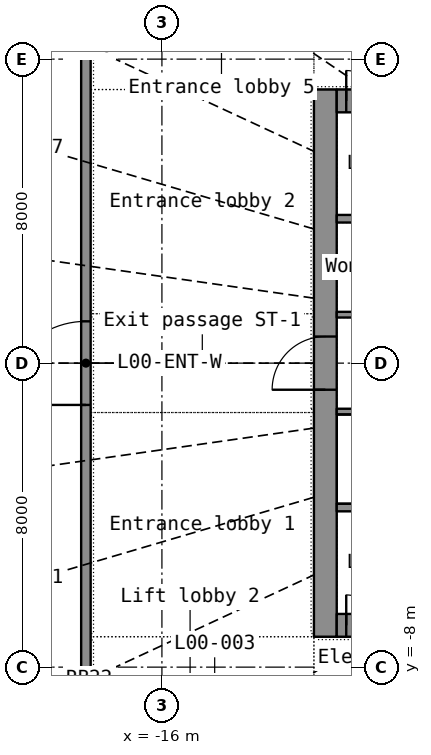
"""IFC4 building model, lengths in metres.
Left out: names, types, materials, properties, quantities, classifications, styles, units other than length and angle.
Written with IfcOpenShell. Run it as: python <this file> out.ifc"""

import sys

from ifc_helpers import new_model, si_unit, direction, frame, frame_2d, origin, place, context, subcontext, project, spatial, rectangle, extrude, element, fill, save


model = new_model("IFC4")
c1 = context("Model", 3, precision=1e-05, world=origin(), true_north=direction((0.0, 1.0)))
c2 = subcontext(c1, "Body", "Model", "MODEL_VIEW")
j1 = project(units=[si_unit("LENGTHUNIT", "METRE"), si_unit("PLANEANGLEUNIT", "RADIAN")], contexts=[c1])
p1 = place(None, origin())
s1 = spatial("IfcSite", under=j1, at=p1, CompositionType="ELEMENT")
p2 = place(p1, origin())
s2 = spatial("IfcBuilding", under=s1, at=p2, CompositionType="ELEMENT")
p3 = place(p2, origin())
s3 = spatial("IfcBuildingStorey", under=s2, at=p3, CompositionType="ELEMENT", Elevation=0.0)
p4 = place(p3, frame((-18.0, -9.0, 0.0), z_axis=(0.0, 0.0, 1.0), x_axis=(0.0, 1.0, 0.0)))
e1 = element("IfcWall", 1, at=p4, inside=s3, PredefinedType="STANDARD", context=c2, shape_type="SweptSolid", body=[
    extrude(rectangle(XDim=18.0, YDim=0.25, at=frame_2d((9.0, 0.0))), origin(), (0.0, 0.0, 1.0), 6.6),
])
p5 = place(p4, frame((7.9, 0.0, 0.0)))
e2 = element("IfcOpeningElement", 2, at=p5, cuts=e1, PredefinedType="OPENING", context=c2, shape_type="SweptSolid", body=[
    extrude(rectangle(XDim=2.2, YDim=2.4, at=frame_2d((1.1, 1.2))), frame((0.0, 0.135, 0.0), z_axis=(0.0, -1.0, 0.0), x_axis=(1.0, 0.0, 0.0)), (0.0, 0.0, 1.0), 0.27),
])
p6 = place(p3, frame((-11.7, -7.2, 0.0), z_axis=(0.0, 0.0, 1.0), x_axis=(0.0, 1.0, 0.0)))
e3 = element("IfcWall", 3, at=p6, inside=s3, PredefinedType="SHEAR", context=c2, shape_type="SweptSolid", body=[
    extrude(rectangle(XDim=14.4, YDim=0.6, at=frame_2d((7.2, 0.0))), origin(), (0.0, 0.0, 1.0), 6.6),
])
p7 = place(p6, frame((6.5, 0.0, 0.0)))
e4 = element("IfcOpeningElement", 4, at=p7, cuts=e3, PredefinedType="OPENING", context=c2, shape_type="SweptSolid", body=[
    extrude(rectangle(XDim=1.4, YDim=2.2, at=frame_2d((0.7, 1.1))), frame((0.0, 0.31, 0.0), z_axis=(0.0, -1.0, 0.0), x_axis=(1.0, 0.0, 0.0)), (0.0, 0.0, 1.0), 0.62),
])
p8 = place(p3, frame((-11.4, -6.9, 0.0), z_axis=(0.0, 0.0, 1.0), x_axis=(1.0, 0.0, 0.0)))
e5 = element("IfcWall", 5, at=p8, inside=s3, PredefinedType="SHEAR", context=c2, shape_type="SweptSolid", body=[
    extrude(rectangle(XDim=22.8, YDim=0.6, at=frame_2d((11.4, 0.0))), origin(), (0.0, 0.0, 1.0), 6.6),
])
p9 = place(p8, frame((1.85, 0.0, 0.0)))
e6 = element("IfcOpeningElement", 6, at=p9, cuts=e5, PredefinedType="OPENING", context=c2, shape_type="SweptSolid", body=[
    extrude(rectangle(XDim=1.1, YDim=2.2, at=frame_2d((0.55, 1.1))), frame((0.0, 0.31, 0.0), z_axis=(0.0, -1.0, 0.0), x_axis=(1.0, 0.0, 0.0)), (0.0, 0.0, 1.0), 0.62),
])
p10 = place(p8, frame((3.85, 0.0, 0.0)))
e7 = element("IfcOpeningElement", 7, at=p10, cuts=e5, PredefinedType="OPENING", context=c2, shape_type="SweptSolid", body=[
    extrude(rectangle(XDim=1.1, YDim=2.2, at=frame_2d((0.55, 1.1))), frame((0.0, 0.31, 0.0), z_axis=(0.0, -1.0, 0.0), x_axis=(1.0, 0.0, 0.0)), (0.0, 0.0, 1.0), 0.62),
])
p11 = place(p8, frame((5.85, 0.0, 0.0)))
e8 = element("IfcOpeningElement", 8, at=p11, cuts=e5, PredefinedType="OPENING", context=c2, shape_type="SweptSolid", body=[
    extrude(rectangle(XDim=1.1, YDim=2.2, at=frame_2d((0.55, 1.1))), frame((0.0, 0.31, 0.0), z_axis=(0.0, -1.0, 0.0), x_axis=(1.0, 0.0, 0.0)), (0.0, 0.0, 1.0), 0.62),
])
p12 = place(p8, frame((7.85, 0.0, 0.0)))
e9 = element("IfcOpeningElement", 9, at=p12, cuts=e5, PredefinedType="OPENING", context=c2, shape_type="SweptSolid", body=[
    extrude(rectangle(XDim=1.1, YDim=2.2, at=frame_2d((0.55, 1.1))), frame((0.0, 0.31, 0.0), z_axis=(0.0, -1.0, 0.0), x_axis=(1.0, 0.0, 0.0)), (0.0, 0.0, 1.0), 0.62),
])
p13 = place(p8, frame((9.85, 0.0, 0.0)))
e10 = element("IfcOpeningElement", 10, at=p13, cuts=e5, PredefinedType="OPENING", context=c2, shape_type="SweptSolid", body=[
    extrude(rectangle(XDim=1.1, YDim=2.2, at=frame_2d((0.55, 1.1))), frame((0.0, 0.31, 0.0), z_axis=(0.0, -1.0, 0.0), x_axis=(1.0, 0.0, 0.0)), (0.0, 0.0, 1.0), 0.62),
])
p14 = place(p8, frame((11.85, 0.0, 0.0)))
e11 = element("IfcOpeningElement", 11, at=p14, cuts=e5, PredefinedType="OPENING", context=c2, shape_type="SweptSolid", body=[
    extrude(rectangle(XDim=1.1, YDim=2.2, at=frame_2d((0.55, 1.1))), frame((0.0, 0.31, 0.0), z_axis=(0.0, -1.0, 0.0), x_axis=(1.0, 0.0, 0.0)), (0.0, 0.0, 1.0), 0.62),
])
p15 = place(p8, frame((13.85, 0.0, 0.0)))
e12 = element("IfcOpeningElement", 12, at=p15, cuts=e5, PredefinedType="OPENING", context=c2, shape_type="SweptSolid", body=[
    extrude(rectangle(XDim=1.1, YDim=2.2, at=frame_2d((0.55, 1.1))), frame((0.0, 0.31, 0.0), z_axis=(0.0, -1.0, 0.0), x_axis=(1.0, 0.0, 0.0)), (0.0, 0.0, 1.0), 0.62),
])
p16 = place(p8, frame((15.85, 0.0, 0.0)))
e13 = element("IfcOpeningElement", 13, at=p16, cuts=e5, PredefinedType="OPENING", context=c2, shape_type="SweptSolid", body=[
    extrude(rectangle(XDim=1.1, YDim=2.2, at=frame_2d((0.55, 1.1))), frame((0.0, 0.31, 0.0), z_axis=(0.0, -1.0, 0.0), x_axis=(1.0, 0.0, 0.0)), (0.0, 0.0, 1.0), 0.62),
])
p17 = place(p8, frame((17.85, 0.0, 0.0)))
e14 = element("IfcOpeningElement", 14, at=p17, cuts=e5, PredefinedType="OPENING", context=c2, shape_type="SweptSolid", body=[
    extrude(rectangle(XDim=1.1, YDim=2.2, at=frame_2d((0.55, 1.1))), frame((0.0, 0.31, 0.0), z_axis=(0.0, -1.0, 0.0), x_axis=(1.0, 0.0, 0.0)), (0.0, 0.0, 1.0), 0.62),
])
p18 = place(p8, frame((19.85, 0.0, 0.0)))
e15 = element("IfcOpeningElement", 15, at=p18, cuts=e5, PredefinedType="OPENING", context=c2, shape_type="SweptSolid", body=[
    extrude(rectangle(XDim=1.1, YDim=2.2, at=frame_2d((0.55, 1.1))), frame((0.0, 0.31, 0.0), z_axis=(0.0, -1.0, 0.0), x_axis=(1.0, 0.0, 0.0)), (0.0, 0.0, 1.0), 0.62),
])
p19 = place(p8, frame((0.25, 0.0, 0.0)))
e16 = element("IfcOpeningElement", 16, at=p19, cuts=e5, PredefinedType="OPENING", context=c2, shape_type="SweptSolid", body=[
    extrude(rectangle(XDim=0.8, YDim=2.05, at=frame_2d((0.4, 1.025))), frame((0.0, 0.31, 0.0), z_axis=(0.0, -1.0, 0.0), x_axis=(1.0, 0.0, 0.0)), (0.0, 0.0, 1.0), 0.62),
])
p20 = place(p8, frame((21.75, 0.0, 0.0)))
e17 = element("IfcOpeningElement", 17, at=p20, cuts=e5, PredefinedType="OPENING", context=c2, shape_type="SweptSolid", body=[
    extrude(rectangle(XDim=0.8, YDim=2.05, at=frame_2d((0.4, 1.025))), frame((0.0, 0.31, 0.0), z_axis=(0.0, -1.0, 0.0), x_axis=(1.0, 0.0, 0.0)), (0.0, 0.0, 1.0), 0.62),
])
p21 = place(p3, frame((-11.4, 6.9, 0.0), z_axis=(0.0, 0.0, 1.0), x_axis=(1.0, 0.0, 0.0)))
e18 = element("IfcWall", 18, at=p21, inside=s3, PredefinedType="SHEAR", context=c2, shape_type="SweptSolid", body=[
    extrude(rectangle(XDim=22.8, YDim=0.6, at=frame_2d((11.4, 0.0))), origin(), (0.0, 0.0, 1.0), 6.6),
])
p22 = place(p21, frame((1.85, 0.0, 0.0)))
e19 = element("IfcOpeningElement", 19, at=p22, cuts=e18, PredefinedType="OPENING", context=c2, shape_type="SweptSolid", body=[
    extrude(rectangle(XDim=1.1, YDim=2.2, at=frame_2d((0.55, 1.1))), frame((0.0, 0.31, 0.0), z_axis=(0.0, -1.0, 0.0), x_axis=(1.0, 0.0, 0.0)), (0.0, 0.0, 1.0), 0.62),
])
p23 = place(p21, frame((3.85, 0.0, 0.0)))
e20 = element("IfcOpeningElement", 20, at=p23, cuts=e18, PredefinedType="OPENING", context=c2, shape_type="SweptSolid", body=[
    extrude(rectangle(XDim=1.1, YDim=2.2, at=frame_2d((0.55, 1.1))), frame((0.0, 0.31, 0.0), z_axis=(0.0, -1.0, 0.0), x_axis=(1.0, 0.0, 0.0)), (0.0, 0.0, 1.0), 0.62),
])
p24 = place(p21, frame((6.95, 0.0, 0.0)))
e21 = element("IfcOpeningElement", 21, at=p24, cuts=e18, PredefinedType="OPENING", context=c2, shape_type="SweptSolid", body=[
    extrude(rectangle(XDim=0.9, YDim=2.1, at=frame_2d((0.45, 1.05))), frame((0.0, 0.31, 0.0), z_axis=(0.0, -1.0, 0.0), x_axis=(1.0, 0.0, 0.0)), (0.0, 0.0, 1.0), 0.62),
])
p25 = place(p21, frame((11.95, 0.0, 0.0)))
e22 = element("IfcOpeningElement", 22, at=p25, cuts=e18, PredefinedType="OPENING", context=c2, shape_type="SweptSolid", body=[
    extrude(rectangle(XDim=0.9, YDim=2.1, at=frame_2d((0.45, 1.05))), frame((0.0, 0.31, 0.0), z_axis=(0.0, -1.0, 0.0), x_axis=(1.0, 0.0, 0.0)), (0.0, 0.0, 1.0), 0.62),
])
p26 = place(p21, frame((17.95, 0.0, 0.0)))
e23 = element("IfcOpeningElement", 23, at=p26, cuts=e18, PredefinedType="OPENING", context=c2, shape_type="SweptSolid", body=[
    extrude(rectangle(XDim=0.9, YDim=2.1, at=frame_2d((0.45, 1.05))), frame((0.0, 0.31, 0.0), z_axis=(0.0, -1.0, 0.0), x_axis=(1.0, 0.0, 0.0)), (0.0, 0.0, 1.0), 0.62),
])
p27 = place(p21, frame((0.25, 0.0, 0.0)))
e24 = element("IfcOpeningElement", 24, at=p27, cuts=e18, PredefinedType="OPENING", context=c2, shape_type="SweptSolid", body=[
    extrude(rectangle(XDim=0.8, YDim=2.05, at=frame_2d((0.4, 1.025))), frame((0.0, 0.31, 0.0), z_axis=(0.0, -1.0, 0.0), x_axis=(1.0, 0.0, 0.0)), (0.0, 0.0, 1.0), 0.62),
])
p28 = place(p21, frame((21.75, 0.0, 0.0)))
e25 = element("IfcOpeningElement", 25, at=p28, cuts=e18, PredefinedType="OPENING", context=c2, shape_type="SweptSolid", body=[
    extrude(rectangle(XDim=0.8, YDim=2.05, at=frame_2d((0.4, 1.025))), frame((0.0, 0.31, 0.0), z_axis=(0.0, -1.0, 0.0), x_axis=(1.0, 0.0, 0.0)), (0.0, 0.0, 1.0), 0.62),
])
for number, where, z_axis, x_axis in (
    (26, (-11.4, -3.8, 0.0), (0.0, 0.0, 1.0), (1.0, 0.0, 0.0)),
    (27, (-11.4, 3.8, 0.0), (0.0, 0.0, 1.0), (1.0, 0.0, 0.0)),
):
    element("IfcWall", number, at=place(p3, frame(where, z_axis=z_axis, x_axis=x_axis)), inside=s3, PredefinedType="SHEAR", context=c2, shape_type="SweptSolid", body=[
        extrude(rectangle(XDim=22.8, YDim=0.2, at=frame_2d((11.4, 0.0))), origin(), (0.0, 0.0, 1.0), 6.6),
    ])
p29 = place(p3, frame((-11.4, -1.275, 0.0), z_axis=(0.0, 0.0, 1.0), x_axis=(1.0, 0.0, 0.0)))
e28 = element("IfcWall", 28, at=p29, inside=s3, PredefinedType="SHEAR", context=c2, shape_type="SweptSolid", body=[
    extrude(rectangle(XDim=8.4, YDim=0.15, at=frame_2d((4.2, 0.0))), origin(), (0.0, 0.0, 1.0), 6.6),
])
p30 = place(p29, frame((5.25, 0.0, 0.0)))
e29 = element("IfcOpeningElement", 29, at=p30, cuts=e28, PredefinedType="OPENING", context=c2, shape_type="SweptSolid", body=[
    extrude(rectangle(XDim=1.1, YDim=2.15, at=frame_2d((0.55, 1.075))), frame((0.0, 0.085, 0.0), z_axis=(0.0, -1.0, 0.0), x_axis=(1.0, 0.0, 0.0)), (0.0, 0.0, 1.0), 0.17),
])
p31 = place(p29, frame((7.05, 0.0, 0.0)))
e30 = element("IfcOpeningElement", 30, at=p31, cuts=e28, PredefinedType="OPENING", context=c2, shape_type="SweptSolid", body=[
    extrude(rectangle(XDim=0.9, YDim=2.1, at=frame_2d((0.45, 1.05))), frame((0.0, 0.085, 0.0), z_axis=(0.0, -1.0, 0.0), x_axis=(1.0, 0.0, 0.0)), (0.0, 0.0, 1.0), 0.17),
])
p32 = place(p3, frame((-11.4, 1.275, 0.0), z_axis=(0.0, 0.0, 1.0), x_axis=(1.0, 0.0, 0.0)))
e31 = element("IfcWall", 31, at=p32, inside=s3, PredefinedType="PARTITIONING", context=c2, shape_type="SweptSolid", body=[
    extrude(rectangle(XDim=8.4, YDim=0.15, at=frame_2d((4.2, 0.0))), origin(), (0.0, 0.0, 1.0), 6.6),
])
p33 = place(p32, frame((1.114, 0.0, 0.0)))
e32 = element("IfcOpeningElement", 32, at=p33, cuts=e31, PredefinedType="OPENING", context=c2, shape_type="SweptSolid", body=[
    extrude(rectangle(XDim=0.85, YDim=2.1, at=frame_2d((0.425, 1.05))), frame((0.0, 0.085, 0.0), z_axis=(0.0, -1.0, 0.0), x_axis=(1.0, 0.0, 0.0)), (0.0, 0.0, 1.0), 0.17),
])
p34 = place(p32, frame((4.342, 0.0, 0.0)))
e33 = element("IfcOpeningElement", 33, at=p34, cuts=e31, PredefinedType="OPENING", context=c2, shape_type="SweptSolid", body=[
    extrude(rectangle(XDim=0.85, YDim=2.1, at=frame_2d((0.425, 1.05))), frame((0.0, 0.085, 0.0), z_axis=(0.0, -1.0, 0.0), x_axis=(1.0, 0.0, 0.0)), (0.0, 0.0, 1.0), 0.17),
])
p35 = place(p32, frame((6.978, 0.0, 0.0)))
e34 = element("IfcOpeningElement", 34, at=p35, cuts=e31, PredefinedType="OPENING", context=c2, shape_type="SweptSolid", body=[
    extrude(rectangle(XDim=0.9, YDim=2.1, at=frame_2d((0.45, 1.05))), frame((0.0, 0.085, 0.0), z_axis=(0.0, -1.0, 0.0), x_axis=(1.0, 0.0, 0.0)), (0.0, 0.0, 1.0), 0.17),
])
p36 = place(p5, origin())
e35 = element("IfcDoor", 35, at=p36, inside=s3, OperationType="DOUBLE_DOOR_SINGLE_SWING", PredefinedType="DOOR", context=c2, shape_type="SweptSolid", body=[
    extrude(rectangle(XDim=2.2, YDim=2.4, at=frame_2d((1.1, 1.2))), frame((0.0, 0.025, 0.0), z_axis=(0.0, -1.0, 0.0), x_axis=(1.0, 0.0, 0.0)), (0.0, 0.0, 1.0), 0.05),
])
fill(e2, e35)
p37 = place(p19, origin())
e36 = element("IfcDoor", 36, at=p37, inside=s3, OperationType="SINGLE_SWING_LEFT", PredefinedType="DOOR", context=c2, shape_type="SweptSolid", body=[
    extrude(rectangle(XDim=0.8, YDim=2.05, at=frame_2d((0.4, 1.025))), frame((0.0, 0.025, 0.0), z_axis=(0.0, -1.0, 0.0), x_axis=(1.0, 0.0, 0.0)), (0.0, 0.0, 1.0), 0.05),
])
fill(e16, e36)
p38 = place(p27, origin())
e37 = element("IfcDoor", 37, at=p38, inside=s3, OperationType="SINGLE_SWING_LEFT", PredefinedType="DOOR", context=c2, shape_type="SweptSolid", body=[
    extrude(rectangle(XDim=0.8, YDim=2.05, at=frame_2d((0.4, 1.025))), frame((0.0, 0.025, 0.0), z_axis=(0.0, -1.0, 0.0), x_axis=(1.0, 0.0, 0.0)), (0.0, 0.0, 1.0), 0.05),
])
fill(e24, e37)
p39 = place(p7, origin())
e38 = element("IfcDoor", 38, at=p39, inside=s3, OperationType="DOUBLE_DOOR_SINGLE_SWING", PredefinedType="DOOR", context=c2, shape_type="SweptSolid", body=[
    extrude(rectangle(XDim=1.4, YDim=2.2, at=frame_2d((0.7, 1.1))), frame((0.0, 0.025, 0.0), z_axis=(0.0, -1.0, 0.0), x_axis=(1.0, 0.0, 0.0)), (0.0, 0.0, 1.0), 0.05),
])
fill(e4, e38)
save(model, sys.argv[1])
